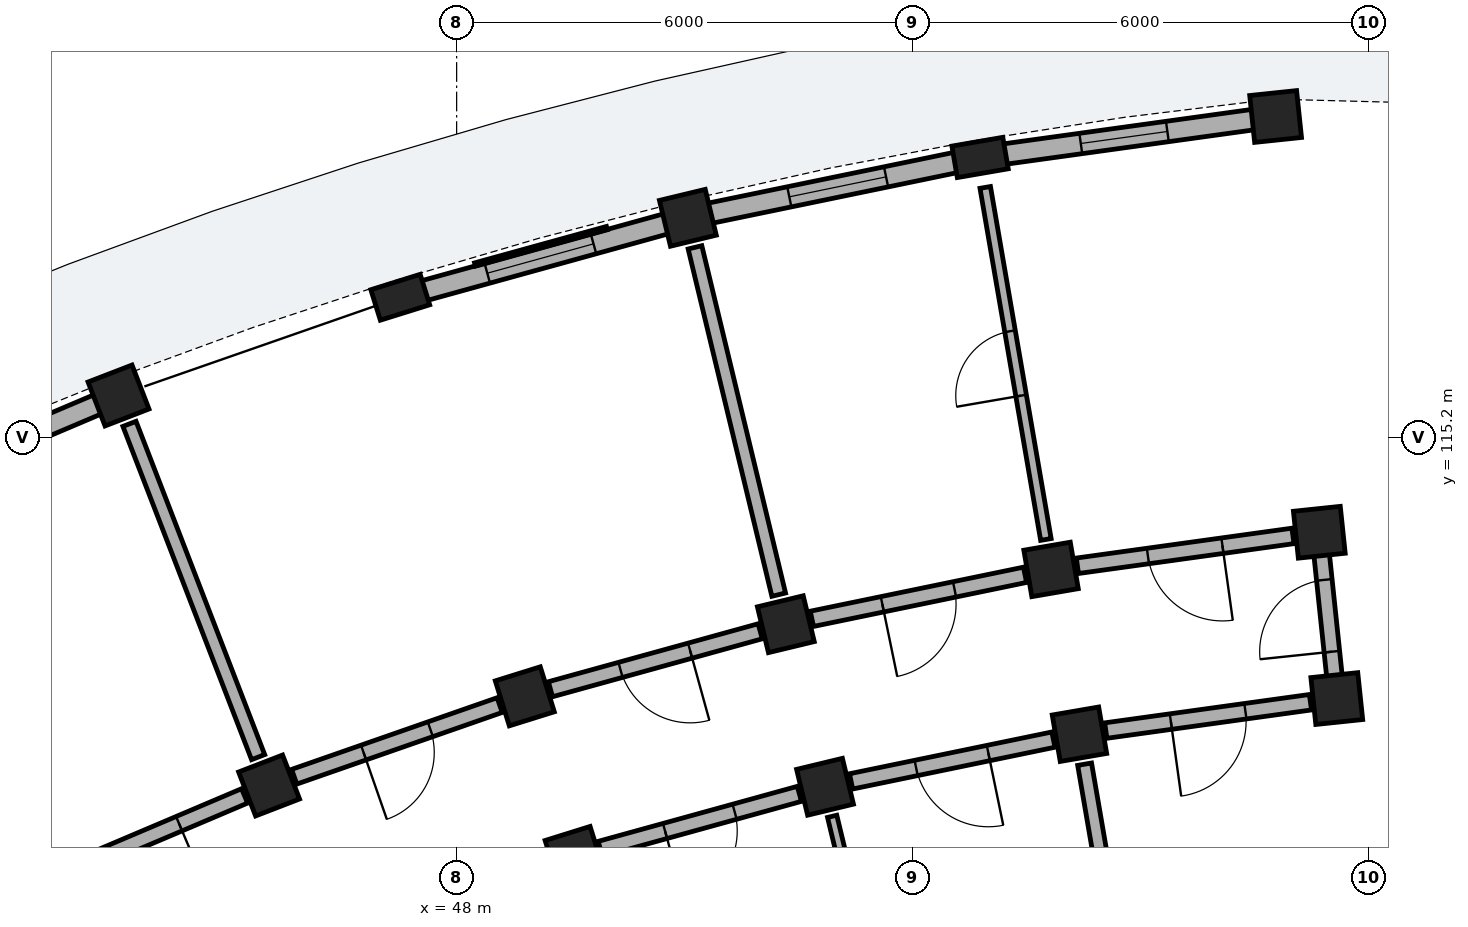
"""IFC4 building model, lengths in metres.
Left out: names, types, materials, properties, quantities, classifications, styles, units other than length and angle.
Written with IfcOpenShell. Run it as: python <this file> out.ifc"""

import sys

from ifc_helpers import new_model, si_unit, direction, frame, frame_2d, origin, origin_2d, place, context, subcontext, project, spatial, rectangle, extrude, element, fill, save


model = new_model("IFC4")
c1 = context("Model", 3, precision=1e-05, world=origin(), true_north=direction((0.0, 1.0)))
c2 = subcontext(c1, "Body", "Model", "MODEL_VIEW")
j1 = project(units=[si_unit("LENGTHUNIT", "METRE"), si_unit("PLANEANGLEUNIT", "RADIAN")], contexts=[c1])
p1 = place(None, origin())
s1 = spatial("IfcSite", under=j1, at=p1, CompositionType="ELEMENT")
p2 = place(p1, origin())
s2 = spatial("IfcBuilding", under=s1, at=p2, CompositionType="ELEMENT")
p3 = place(p2, origin())
s3 = spatial("IfcBuildingStorey", under=s2, at=p3, CompositionType="ELEMENT", Elevation=0.0)
for number, where, z_axis, x_axis in (
    (1, (59.58, 111.766, 0.0), (0.0, 0.0, 1.0), (-0.105, 0.995, 0.0)),
    (2, (59.35, 113.954, 0.0), (0.0, 0.0, 1.0), (-0.105, 0.995, 0.0)),
    (3, (58.775, 119.424, 0.0), (0.0, 0.0, 1.0), (-0.105, 0.995, 0.0)),
    (4, (56.194, 111.297, 0.0), (0.0, 0.0, 1.0), (-0.17, 0.985, 0.0)),
    (5, (55.821, 113.465, 0.0), (0.0, 0.0, 1.0), (-0.17, 0.985, 0.0)),
):
    element("IfcColumn", number, at=place(p3, frame(where, z_axis=z_axis, x_axis=x_axis)), inside=s3, PredefinedType="COLUMN", context=c2, shape_type="SweptSolid", body=[
        extrude(rectangle(XDim=0.62, YDim=0.62, at=origin_2d()), origin(), (0.0, 0.0, 1.0), 4.485),
    ])
p4 = place(p3, frame((54.887, 118.885, 0.0), z_axis=(0.0, 0.0, 1.0), x_axis=(-0.169827298811, 0.985473839622, 0.0)))
e6 = element("IfcColumn", 6, at=p4, inside=s3, PredefinedType="PILASTER", context=c2, shape_type="SweptSolid", body=[
    extrude(rectangle(XDim=0.42, YDim=0.68, at=origin_2d()), origin(), (0.0, 0.0, 1.0), 4.485),
])
for number, where, z_axis, x_axis in (
    (7, (52.847, 110.606, 0.0), (0.0, 0.0, 1.0), (-0.234, 0.972, 0.0)),
    (8, (52.331, 112.744, 0.0), (0.0, 0.0, 1.0), (-0.234, 0.972, 0.0)),
    (9, (51.042, 118.091, 0.0), (0.0, 0.0, 1.0), (-0.234, 0.972, 0.0)),
    (10, (49.552, 109.695, 0.0), (0.0, 0.0, 1.0), (-0.298, 0.955, 0.0)),
    (11, (48.897, 111.795, 0.0), (0.0, 0.0, 1.0), (-0.298, 0.955, 0.0)),
):
    element("IfcColumn", number, at=place(p3, frame(where, z_axis=z_axis, x_axis=x_axis)), inside=s3, PredefinedType="COLUMN", context=c2, shape_type="SweptSolid", body=[
        extrude(rectangle(XDim=0.62, YDim=0.62, at=origin_2d()), origin(), (0.0, 0.0, 1.0), 4.485),
    ])
p5 = place(p3, frame((47.258, 117.046, 0.0), z_axis=(0.0, 0.0, 1.0), x_axis=(-0.297930292146, 0.954587628781, 0.0)))
e12 = element("IfcColumn", 12, at=p5, inside=s3, PredefinedType="PILASTER", context=c2, shape_type="SweptSolid", body=[
    extrude(rectangle(XDim=0.42, YDim=0.68, at=origin_2d()), origin(), (0.0, 0.0, 1.0), 4.485),
])
for number, where, z_axis, x_axis in (
    (13, (45.532, 110.622, 0.0), (0.0, 0.0, 1.0), (-0.36, 0.933, 0.0)),
    (14, (43.552, 115.753, 0.0), (0.0, 0.0, 1.0), (-0.36, 0.933, 0.0)),
):
    element("IfcColumn", number, at=place(p3, frame(where, z_axis=z_axis, x_axis=x_axis)), inside=s3, PredefinedType="COLUMN", context=c2, shape_type="SweptSolid", body=[
        extrude(rectangle(XDim=0.62, YDim=0.62, at=origin_2d()), origin(), (0.0, 0.0, 1.0), 4.485),
    ])
p6 = place(p3, frame((58.498, 119.385, 0.0), z_axis=(0.0, 0.0, 1.0), x_axis=(-0.990539409892, -0.137228559169, 0.0)))
e15 = element("IfcWall", 15, at=p6, inside=s3, PredefinedType="SOLIDWALL", context=c2, shape_type="SweptSolid", body=[
    extrude(rectangle(XDim=3.466, YDim=0.27, at=frame_2d((1.733, 0.0))), origin(), (0.0, 0.0, 1.0), 3.755),
])
p7 = place(p6, frame((1.158, 0.0, 0.55)))
e16 = element("IfcOpeningElement", 16, at=p7, cuts=e15, PredefinedType="OPENING", context=c2, shape_type="SweptSolid", body=[
    extrude(rectangle(XDim=1.15, YDim=1.5, at=frame_2d((0.575, 0.75))), frame((0.0, 0.145, 0.0), z_axis=(0.0, -1.0, 0.0), x_axis=(1.0, 0.0, 0.0)), (0.0, 0.0, 1.0), 0.29),
])
p8 = place(p3, frame((54.71, 118.849, 0.0), z_axis=(0.0, 0.0, 1.0), x_axis=(-0.979334093554, -0.202249185915, 0.0)))
e17 = element("IfcWall", 17, at=p8, inside=s3, PredefinedType="SOLIDWALL", context=c2, shape_type="SweptSolid", body=[
    extrude(rectangle(XDim=3.466, YDim=0.27, at=frame_2d((1.733, 0.0))), origin(), (0.0, 0.0, 1.0), 3.755),
])
p9 = place(p8, frame((1.083, 0.0, 0.55)))
e18 = element("IfcOpeningElement", 18, at=p9, cuts=e17, PredefinedType="OPENING", context=c2, shape_type="SweptSolid", body=[
    extrude(rectangle(XDim=1.3, YDim=1.6, at=frame_2d((0.65, 0.8))), frame((0.0, 0.145, 0.0), z_axis=(0.0, -1.0, 0.0), x_axis=(1.0, 0.0, 0.0)), (0.0, 0.0, 1.0), 0.29),
])
p10 = place(p3, frame((50.772, 118.017, 0.0), z_axis=(0.0, 0.0, 1.0), x_axis=(-0.963895410198, -0.266281126255, 0.0)))
e19 = element("IfcWall", 19, at=p10, inside=s3, PredefinedType="SOLIDWALL", context=c2, shape_type="SweptSolid", body=[
    extrude(rectangle(XDim=3.466, YDim=0.27, at=frame_2d((1.733, 0.0))), origin(), (0.0, 0.0, 1.0), 3.755),
])
p11 = place(p10, frame((1.008, 0.0, 0.55)))
e20 = element("IfcOpeningElement", 20, at=p11, cuts=e19, PredefinedType="OPENING", context=c2, shape_type="SweptSolid", body=[
    extrude(rectangle(XDim=1.45, YDim=1.7, at=frame_2d((0.725, 0.85))), frame((0.0, 0.145, 0.0), z_axis=(0.0, -1.0, 0.0), x_axis=(1.0, 0.0, 0.0)), (0.0, 0.0, 1.0), 0.29),
])
p12 = place(p3, frame((43.294, 115.644, 0.0), z_axis=(0.0, 0.0, 1.0), x_axis=(-0.920495033259, -0.390754262607, 0.0)))
e21 = element("IfcWall", 21, at=p12, inside=s3, PredefinedType="SOLIDWALL", context=c2, shape_type="SweptSolid", body=[
    extrude(rectangle(XDim=3.466, YDim=0.27, at=frame_2d((1.733, 0.0))), origin(), (0.0, 0.0, 1.0), 3.755),
])
p13 = place(p12, frame((0.858, 0.0, 0.55)))
e22 = element("IfcOpeningElement", 22, at=p13, cuts=e21, PredefinedType="OPENING", context=c2, shape_type="SweptSolid", body=[
    extrude(rectangle(XDim=1.75, YDim=1.85, at=frame_2d((0.875, 0.925))), frame((0.0, 0.145, 0.0), z_axis=(0.0, -1.0, 0.0), x_axis=(1.0, 0.0, 0.0)), (0.0, 0.0, 1.0), 0.29),
])
p14 = place(p3, frame((59.004, 113.906, 0.0), z_axis=(0.0, 0.0, 1.0), x_axis=(-0.990544162976, -0.137194246211, 0.0)))
e23 = element("IfcWall", 23, at=p14, inside=s3, PredefinedType="PARTITIONING", context=c2, shape_type="SweptSolid", body=[
    extrude(rectangle(XDim=2.863, YDim=0.205, at=frame_2d((1.432, 0.0))), origin(), (0.0, 0.0, 1.0), 3.1),
])
p15 = place(p14, frame((0.937, 0.0, 0.0)))
e24 = element("IfcOpeningElement", 24, at=p15, cuts=e23, PredefinedType="OPENING", context=c2, shape_type="SweptSolid", body=[
    extrude(rectangle(XDim=0.99, YDim=2.16, at=frame_2d((0.495, 1.08))), frame((0.0, 0.113, 0.0), z_axis=(0.0, -1.0, 0.0), x_axis=(1.0, 0.0, 0.0)), (0.0, 0.0, 1.0), 0.225),
])
p16 = place(p3, frame((59.233, 111.718, 0.0), z_axis=(0.0, 0.0, 1.0), x_axis=(-0.990535404475, -0.137257467855, 0.0)))
e25 = element("IfcWall", 25, at=p16, inside=s3, PredefinedType="PARTITIONING", context=c2, shape_type="SweptSolid", body=[
    extrude(rectangle(XDim=2.718, YDim=0.205, at=frame_2d((1.359, 0.0))), origin(), (0.0, 0.0, 1.0), 3.1),
])
p17 = place(p16, frame((0.864, 0.0, 0.0)))
e26 = element("IfcOpeningElement", 26, at=p17, cuts=e25, PredefinedType="OPENING", context=c2, shape_type="SweptSolid", body=[
    extrude(rectangle(XDim=0.99, YDim=2.16, at=frame_2d((0.495, 1.08))), frame((0.0, 0.113, 0.0), z_axis=(0.0, -1.0, 0.0), x_axis=(1.0, 0.0, 0.0)), (0.0, 0.0, 1.0), 0.225),
])
p18 = place(p3, frame((55.753, 113.859, 0.0), z_axis=(0.0, 0.0, 1.0), x_axis=(-0.169812980219, 0.985476307046, 0.0)))
e27 = element("IfcWall", 27, at=p18, inside=s3, PredefinedType="PLUMBINGWALL", context=c2, shape_type="SweptSolid", body=[
    extrude(rectangle(XDim=4.7, YDim=0.14, at=frame_2d((2.35, 0.0))), origin(), (0.0, 0.0, 1.0), 3.1),
])
p19 = place(p18, frame((1.92, 0.0, 0.0)))
e28 = element("IfcOpeningElement", 28, at=p19, cuts=e27, PredefinedType="OPENING", context=c2, shape_type="SweptSolid", body=[
    extrude(rectangle(XDim=0.86, YDim=2.06, at=frame_2d((0.43, 1.03))), frame((0.0, 0.08, 0.0), z_axis=(0.0, -1.0, 0.0), x_axis=(1.0, 0.0, 0.0)), (0.0, 0.0, 1.0), 0.16),
])
p20 = place(p3, frame((57.383, 104.398, 0.0), z_axis=(0.0, 0.0, 1.0), x_axis=(-0.169825160084, 0.985474208187, 0.0)))
e29 = element("IfcWall", 29, at=p20, inside=s3, PredefinedType="PARTITIONING", context=c2, shape_type="SweptSolid", body=[
    extrude(rectangle(XDim=6.6, YDim=0.185, at=frame_2d((3.3, 0.0))), origin(), (0.0, 0.0, 1.0), 3.1),
])
p21 = place(p3, frame((55.478, 113.394, 0.0), z_axis=(0.0, 0.0, 1.0), x_axis=(-0.979348418612, -0.202179808492, 0.0)))
e30 = element("IfcWall", 30, at=p21, inside=s3, PredefinedType="PARTITIONING", context=c2, shape_type="SweptSolid", body=[
    extrude(rectangle(XDim=2.863, YDim=0.205, at=frame_2d((1.432, 0.0))), origin(), (0.0, 0.0, 1.0), 3.1),
])
p22 = place(p21, frame((0.947, 0.0, 0.0)))
e31 = element("IfcOpeningElement", 31, at=p22, cuts=e30, PredefinedType="OPENING", context=c2, shape_type="SweptSolid", body=[
    extrude(rectangle(XDim=0.97, YDim=2.15, at=frame_2d((0.485, 1.075))), frame((0.0, 0.113, 0.0), z_axis=(0.0, -1.0, 0.0), x_axis=(1.0, 0.0, 0.0)), (0.0, 0.0, 1.0), 0.225),
])
p23 = place(p3, frame((55.852, 111.226, 0.0), z_axis=(0.0, 0.0, 1.0), x_axis=(-0.979349423541, -0.202174940608, 0.0)))
e32 = element("IfcWall", 32, at=p23, inside=s3, PredefinedType="PARTITIONING", context=c2, shape_type="SweptSolid", body=[
    extrude(rectangle(XDim=2.718, YDim=0.205, at=frame_2d((1.359, 0.0))), origin(), (0.0, 0.0, 1.0), 3.1),
])
p24 = place(p23, frame((0.874, 0.0, 0.0)))
e33 = element("IfcOpeningElement", 33, at=p24, cuts=e32, PredefinedType="OPENING", context=c2, shape_type="SweptSolid", body=[
    extrude(rectangle(XDim=0.97, YDim=2.15, at=frame_2d((0.485, 1.075))), frame((0.0, 0.113, 0.0), z_axis=(0.0, -1.0, 0.0), x_axis=(1.0, 0.0, 0.0)), (0.0, 0.0, 1.0), 0.225),
])
p25 = place(p3, frame((52.238, 113.133, 0.0), z_axis=(0.0, 0.0, 1.0), x_axis=(-0.234386624934, 0.972143461662, 0.0)))
e34 = element("IfcWall", 34, at=p25, inside=s3, PredefinedType="PARTITIONING", context=c2, shape_type="SweptSolid", body=[
    extrude(rectangle(XDim=4.7, YDim=0.185, at=frame_2d((2.35, 0.0))), origin(), (0.0, 0.0, 1.0), 3.1),
])
p26 = place(p3, frame((54.488, 103.801, 0.0), z_axis=(0.0, 0.0, 1.0), x_axis=(-0.234406698576, 0.972138621629, 0.0)))
e35 = element("IfcWall", 35, at=p26, inside=s3, PredefinedType="PARTITIONING", context=c2, shape_type="SweptSolid", body=[
    extrude(rectangle(XDim=6.6, YDim=0.125, at=frame_2d((3.3, 0.0))), origin(), (0.0, 0.0, 1.0), 3.1),
])
p27 = place(p26, frame((2.865, 0.0, 0.0)))
e36 = element("IfcOpeningElement", 36, at=p27, cuts=e35, PredefinedType="OPENING", context=c2, shape_type="SweptSolid", body=[
    extrude(rectangle(XDim=0.87, YDim=2.08, at=frame_2d((0.435, 1.04))), frame((0.0, 0.073, 0.0), z_axis=(0.0, -1.0, 0.0), x_axis=(1.0, 0.0, 0.0)), (0.0, 0.0, 1.0), 0.145),
])
p28 = place(p3, frame((51.994, 112.651, 0.0), z_axis=(0.0, 0.0, 1.0), x_axis=(-0.963890789093, -0.266297853356, 0.0)))
e37 = element("IfcWall", 37, at=p28, inside=s3, PredefinedType="PARTITIONING", context=c2, shape_type="SweptSolid", body=[
    extrude(rectangle(XDim=2.863, YDim=0.205, at=frame_2d((1.432, 0.0))), origin(), (0.0, 0.0, 1.0), 3.1),
])
p29 = place(p28, frame((0.957, 0.0, 0.0)))
e38 = element("IfcOpeningElement", 38, at=p29, cuts=e37, PredefinedType="OPENING", context=c2, shape_type="SweptSolid", body=[
    extrude(rectangle(XDim=0.95, YDim=2.13, at=frame_2d((0.475, 1.065))), frame((0.0, 0.113, 0.0), z_axis=(0.0, -1.0, 0.0), x_axis=(1.0, 0.0, 0.0)), (0.0, 0.0, 1.0), 0.225),
])
p30 = place(p3, frame((52.51, 110.512, 0.0), z_axis=(0.0, 0.0, 1.0), x_axis=(-0.96388375821, -0.266323301006, 0.0)))
e39 = element("IfcWall", 39, at=p30, inside=s3, PredefinedType="PARTITIONING", context=c2, shape_type="SweptSolid", body=[
    extrude(rectangle(XDim=2.718, YDim=0.205, at=frame_2d((1.359, 0.0))), origin(), (0.0, 0.0, 1.0), 3.1),
])
p31 = place(p30, frame((0.884, 0.0, 0.0)))
e40 = element("IfcOpeningElement", 40, at=p31, cuts=e39, PredefinedType="OPENING", context=c2, shape_type="SweptSolid", body=[
    extrude(rectangle(XDim=0.95, YDim=2.13, at=frame_2d((0.475, 1.065))), frame((0.0, 0.113, 0.0), z_axis=(0.0, -1.0, 0.0), x_axis=(1.0, 0.0, 0.0)), (0.0, 0.0, 1.0), 0.225),
])
p32 = place(p3, frame((48.566, 111.68, 0.0), z_axis=(0.0, 0.0, 1.0), x_axis=(-0.944253820929, -0.329218349522, 0.0)))
e41 = element("IfcWall", 41, at=p32, inside=s3, PredefinedType="PARTITIONING", context=c2, shape_type="SweptSolid", body=[
    extrude(rectangle(XDim=2.863, YDim=0.205, at=frame_2d((1.432, 0.0))), origin(), (0.0, 0.0, 1.0), 3.1),
])
p33 = place(p32, frame((0.967, 0.0, 0.0)))
e42 = element("IfcOpeningElement", 42, at=p33, cuts=e41, PredefinedType="OPENING", context=c2, shape_type="SweptSolid", body=[
    extrude(rectangle(XDim=0.93, YDim=2.12, at=frame_2d((0.465, 1.06))), frame((0.0, 0.113, 0.0), z_axis=(0.0, -1.0, 0.0), x_axis=(1.0, 0.0, 0.0)), (0.0, 0.0, 1.0), 0.225),
])
p34 = place(p3, frame((45.388, 110.996, 0.0), z_axis=(0.0, 0.0, 1.0), x_axis=(-0.360186633854, 0.932880264982, 0.0)))
e43 = element("IfcWall", 43, at=p34, inside=s3, PredefinedType="PARTITIONING", context=c2, shape_type="SweptSolid", body=[
    extrude(rectangle(XDim=4.7, YDim=0.185, at=frame_2d((2.35, 0.0))), origin(), (0.0, 0.0, 1.0), 3.1),
])
p35 = place(p3, frame((45.21, 110.486, 0.0), z_axis=(0.0, 0.0, 1.0), x_axis=(-0.920511160294, -0.390716270168, 0.0)))
e44 = element("IfcWall", 44, at=p35, inside=s3, PredefinedType="PARTITIONING", context=c2, shape_type="SweptSolid", body=[
    extrude(rectangle(XDim=2.863, YDim=0.205, at=frame_2d((1.432, 0.0))), origin(), (0.0, 0.0, 1.0), 3.1),
])
p36 = place(p35, frame((0.937, 0.0, 0.0)))
e45 = element("IfcOpeningElement", 45, at=p36, cuts=e44, PredefinedType="OPENING", context=c2, shape_type="SweptSolid", body=[
    extrude(rectangle(XDim=0.99, YDim=2.16, at=frame_2d((0.495, 1.08))), frame((0.0, 0.113, 0.0), z_axis=(0.0, -1.0, 0.0), x_axis=(1.0, 0.0, 0.0)), (0.0, 0.0, 1.0), 0.225),
])
p37 = place(p3, frame((59.575, 111.816, 0.0), z_axis=(0.0, 0.0, 1.0), x_axis=(-0.104509292252, 0.994523910136, 0.0)))
e46 = element("IfcWall", 46, at=p37, inside=s3, PredefinedType="PARTITIONING", context=c2, shape_type="SweptSolid", body=[
    extrude(rectangle(XDim=2.1, YDim=0.205, at=frame_2d((1.05, 0.0))), origin(), (0.0, 0.0, 1.0), 3.1),
])
p38 = place(p37, frame((0.57, 0.0, 0.0)))
e47 = element("IfcOpeningElement", 47, at=p38, cuts=e46, PredefinedType="OPENING", context=c2, shape_type="SweptSolid", body=[
    extrude(rectangle(XDim=0.95, YDim=2.13, at=frame_2d((0.475, 1.065))), frame((0.0, 0.113, 0.0), z_axis=(0.0, -1.0, 0.0), x_axis=(1.0, 0.0, 0.0)), (0.0, 0.0, 1.0), 0.225),
])
p39 = place(p7, origin())
e48 = element("IfcWindow", 48, at=p39, inside=s3, PartitioningType="SINGLE_PANEL", PredefinedType="WINDOW", context=c2, shape_type="SweptSolid", body=[
    extrude(rectangle(XDim=1.15, YDim=1.5, at=frame_2d((0.575, 0.75))), frame((0.0, 0.03, 0.0), z_axis=(0.0, -1.0, 0.0), x_axis=(1.0, 0.0, 0.0)), (0.0, 0.0, 1.0), 0.06),
])
fill(e16, e48)
p40 = place(p9, origin())
e49 = element("IfcWindow", 49, at=p40, inside=s3, PartitioningType="SINGLE_PANEL", PredefinedType="WINDOW", context=c2, shape_type="SweptSolid", body=[
    extrude(rectangle(XDim=1.3, YDim=1.6, at=frame_2d((0.65, 0.8))), frame((0.0, 0.03, 0.0), z_axis=(0.0, -1.0, 0.0), x_axis=(1.0, 0.0, 0.0)), (0.0, 0.0, 1.0), 0.06),
])
fill(e18, e49)
p41 = place(p11, origin())
e50 = element("IfcWindow", 50, at=p41, inside=s3, PartitioningType="SINGLE_PANEL", PredefinedType="WINDOW", context=c2, shape_type="SweptSolid", body=[
    extrude(rectangle(XDim=1.45, YDim=1.7, at=frame_2d((0.725, 0.85))), frame((0.0, 0.03, 0.0), z_axis=(0.0, -1.0, 0.0), x_axis=(1.0, 0.0, 0.0)), (0.0, 0.0, 1.0), 0.06),
])
fill(e20, e50)
p42 = place(p15, origin())
e51 = element("IfcDoor", 51, at=p42, inside=s3, OperationType="SINGLE_SWING_LEFT", PredefinedType="DOOR", context=c2, shape_type="SweptSolid", body=[
    extrude(rectangle(XDim=0.99, YDim=2.16, at=frame_2d((0.495, 1.08))), frame((0.0, 0.025, 0.0), z_axis=(0.0, -1.0, 0.0), x_axis=(1.0, 0.0, 0.0)), (0.0, 0.0, 1.0), 0.05),
])
fill(e24, e51)
p43 = place(p17, origin())
e52 = element("IfcDoor", 52, at=p43, inside=s3, OperationType="SINGLE_SWING_RIGHT", PredefinedType="DOOR", context=c2, shape_type="SweptSolid", body=[
    extrude(rectangle(XDim=0.99, YDim=2.16, at=frame_2d((0.495, 1.08))), frame((0.0, 0.025, 0.0), z_axis=(0.0, -1.0, 0.0), x_axis=(1.0, 0.0, 0.0)), (0.0, 0.0, 1.0), 0.05),
])
fill(e26, e52)
p44 = place(p19, origin())
e53 = element("IfcDoor", 53, at=p44, inside=s3, OperationType="SINGLE_SWING_LEFT", PredefinedType="DOOR", context=c2, shape_type="SweptSolid", body=[
    extrude(rectangle(XDim=0.86, YDim=2.06, at=frame_2d((0.43, 1.03))), frame((0.0, 0.025, 0.0), z_axis=(0.0, -1.0, 0.0), x_axis=(1.0, 0.0, 0.0)), (0.0, 0.0, 1.0), 0.05),
])
fill(e28, e53)
p45 = place(p22, origin())
e54 = element("IfcDoor", 54, at=p45, inside=s3, OperationType="SINGLE_SWING_RIGHT", PredefinedType="DOOR", context=c2, shape_type="SweptSolid", body=[
    extrude(rectangle(XDim=0.97, YDim=2.15, at=frame_2d((0.485, 1.075))), frame((0.0, 0.025, 0.0), z_axis=(0.0, -1.0, 0.0), x_axis=(1.0, 0.0, 0.0)), (0.0, 0.0, 1.0), 0.05),
])
fill(e31, e54)
p46 = place(p24, origin())
e55 = element("IfcDoor", 55, at=p46, inside=s3, OperationType="SINGLE_SWING_LEFT", PredefinedType="DOOR", context=c2, shape_type="SweptSolid", body=[
    extrude(rectangle(XDim=0.97, YDim=2.15, at=frame_2d((0.485, 1.075))), frame((0.0, 0.025, 0.0), z_axis=(0.0, -1.0, 0.0), x_axis=(1.0, 0.0, 0.0)), (0.0, 0.0, 1.0), 0.05),
])
fill(e33, e55)
p47 = place(p29, origin())
e56 = element("IfcDoor", 56, at=p47, inside=s3, OperationType="SINGLE_SWING_LEFT", PredefinedType="DOOR", context=c2, shape_type="SweptSolid", body=[
    extrude(rectangle(XDim=0.95, YDim=2.13, at=frame_2d((0.475, 1.065))), frame((0.0, 0.025, 0.0), z_axis=(0.0, -1.0, 0.0), x_axis=(1.0, 0.0, 0.0)), (0.0, 0.0, 1.0), 0.05),
])
fill(e38, e56)
p48 = place(p31, origin())
e57 = element("IfcDoor", 57, at=p48, inside=s3, OperationType="SINGLE_SWING_RIGHT", PredefinedType="DOOR", context=c2, shape_type="SweptSolid", body=[
    extrude(rectangle(XDim=0.95, YDim=2.13, at=frame_2d((0.475, 1.065))), frame((0.0, 0.025, 0.0), z_axis=(0.0, -1.0, 0.0), x_axis=(1.0, 0.0, 0.0)), (0.0, 0.0, 1.0), 0.05),
])
fill(e40, e57)
p49 = place(p33, origin())
e58 = element("IfcDoor", 58, at=p49, inside=s3, OperationType="SINGLE_SWING_RIGHT", PredefinedType="DOOR", context=c2, shape_type="SweptSolid", body=[
    extrude(rectangle(XDim=0.93, YDim=2.12, at=frame_2d((0.465, 1.06))), frame((0.0, 0.025, 0.0), z_axis=(0.0, -1.0, 0.0), x_axis=(1.0, 0.0, 0.0)), (0.0, 0.0, 1.0), 0.05),
])
fill(e42, e58)
p50 = place(p36, origin())
e59 = element("IfcDoor", 59, at=p50, inside=s3, OperationType="SINGLE_SWING_LEFT", PredefinedType="DOOR", context=c2, shape_type="SweptSolid", body=[
    extrude(rectangle(XDim=0.99, YDim=2.16, at=frame_2d((0.495, 1.08))), frame((0.0, 0.025, 0.0), z_axis=(0.0, -1.0, 0.0), x_axis=(1.0, 0.0, 0.0)), (0.0, 0.0, 1.0), 0.05),
])
fill(e45, e59)
p51 = place(p38, origin())
e60 = element("IfcDoor", 60, at=p51, inside=s3, OperationType="SINGLE_SWING_LEFT", PredefinedType="DOOR", context=c2, shape_type="SweptSolid", body=[
    extrude(rectangle(XDim=0.95, YDim=2.13, at=frame_2d((0.475, 1.065))), frame((0.0, 0.025, 0.0), z_axis=(0.0, -1.0, 0.0), x_axis=(1.0, 0.0, 0.0)), (0.0, 0.0, 1.0), 0.05),
])
fill(e47, e60)
save(model, sys.argv[1])
